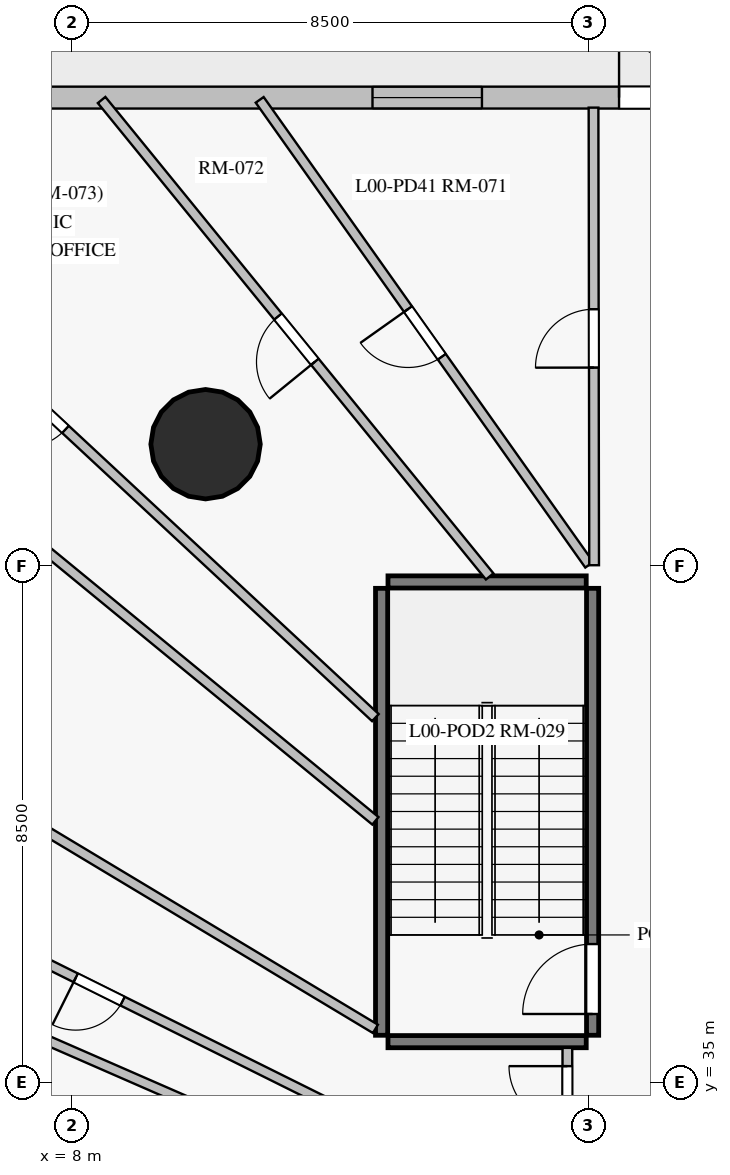
"""IFC4 building model, lengths in metres.
Left out: names, types, materials, properties, quantities, classifications, styles, units other than length and angle.
Written with IfcOpenShell. Run it as: python <this file> out.ifc"""

import sys

from ifc_helpers import new_model, si_unit, direction, frame, frame_2d, origin, origin_with_axes, origin_2d, place, context, subcontext, project, spatial, rectangle, circle, extrude, source, transform, mapped, element, fill, save


model = new_model("IFC4")
c1 = context("Model", 3, precision=1e-05, world=origin(), true_north=direction((0.0, 1.0)))
c2 = subcontext(c1, "Body", "Model", "MODEL_VIEW")
j1 = project(units=[si_unit("LENGTHUNIT", "METRE"), si_unit("PLANEANGLEUNIT", "RADIAN")], contexts=[c1])
p1 = place(None, origin())
s1 = spatial("IfcSite", under=j1, at=p1, CompositionType="ELEMENT")
p2 = place(p1, origin())
s2 = spatial("IfcBuilding", under=s1, at=p2, CompositionType="ELEMENT")
p3 = place(p2, origin())
s3 = spatial("IfcBuildingStorey", under=s2, at=p3, CompositionType="ELEMENT", Elevation=0.0)
m1 = source(origin_with_axes(), c2, "Body", "SweptSolid", [
    extrude(circle(Radius=0.9, at=origin_2d()), origin(), (0.0, 0.0, 1.0), 4.5),
])
p4 = place(p3, frame((10.2, 45.5, 0.0), z_axis=(0.0, 0.0, 1.0), x_axis=(1.0, 0.0, 0.0)))
e1 = element("IfcColumn", 1, at=p4, inside=s3, PredefinedType="COLUMN", context=c2, shape_type="MappedRepresentation", body=[
    mapped(m1, transform((0.0, 0.0, 0.0), scale=1.0)),
])
p5 = place(p3, frame((1.5, 51.2, 0.0), z_axis=(0.0, 0.0, 1.0), x_axis=(1.0, 0.0, 0.0)))
e2 = element("IfcWall", 2, at=p5, inside=s3, PredefinedType="SOLIDWALL", context=c2, shape_type="SweptSolid", body=[
    extrude(rectangle(XDim=54.6, YDim=0.36, at=frame_2d((27.3, 0.0))), origin(), (0.0, 0.0, 1.0), 4.2),
])
p6 = place(p5, frame((51.007, 0.0, 0.85)))
e3 = element("IfcOpeningElement", 3, at=p6, cuts=e2, PredefinedType="OPENING", context=c2, shape_type="SweptSolid", body=[
    extrude(rectangle(XDim=1.8, YDim=2.2, at=frame_2d((0.9, 1.1))), frame((0.0, 0.19, 0.0), z_axis=(0.0, -1.0, 0.0), x_axis=(1.0, 0.0, 0.0)), (0.0, 0.0, 1.0), 0.38),
])
p7 = place(p5, frame((46.765, 0.0, 0.85)))
e4 = element("IfcOpeningElement", 4, at=p7, cuts=e2, PredefinedType="OPENING", context=c2, shape_type="SweptSolid", body=[
    extrude(rectangle(XDim=1.8, YDim=2.2, at=frame_2d((0.9, 1.1))), frame((0.0, 0.19, 0.0), z_axis=(0.0, -1.0, 0.0), x_axis=(1.0, 0.0, 0.0)), (0.0, 0.0, 1.0), 0.38),
])
p8 = place(p5, frame((41.844, 0.0, 0.85)))
e5 = element("IfcOpeningElement", 5, at=p8, cuts=e2, PredefinedType="OPENING", context=c2, shape_type="SweptSolid", body=[
    extrude(rectangle(XDim=1.8, YDim=2.2, at=frame_2d((0.9, 1.1))), frame((0.0, 0.19, 0.0), z_axis=(0.0, -1.0, 0.0), x_axis=(1.0, 0.0, 0.0)), (0.0, 0.0, 1.0), 0.38),
])
p9 = place(p5, frame((36.894, 0.0, 0.85)))
e6 = element("IfcOpeningElement", 6, at=p9, cuts=e2, PredefinedType="OPENING", context=c2, shape_type="SweptSolid", body=[
    extrude(rectangle(XDim=1.8, YDim=2.2, at=frame_2d((0.9, 1.1))), frame((0.0, 0.19, 0.0), z_axis=(0.0, -1.0, 0.0), x_axis=(1.0, 0.0, 0.0)), (0.0, 0.0, 1.0), 0.38),
])
p10 = place(p5, frame((29.542, 0.0, 0.85)))
e7 = element("IfcOpeningElement", 7, at=p10, cuts=e2, PredefinedType="OPENING", context=c2, shape_type="SweptSolid", body=[
    extrude(rectangle(XDim=1.8, YDim=2.2, at=frame_2d((0.9, 1.1))), frame((0.0, 0.19, 0.0), z_axis=(0.0, -1.0, 0.0), x_axis=(1.0, 0.0, 0.0)), (0.0, 0.0, 1.0), 0.38),
])
p11 = place(p5, frame((25.094, 0.0, 0.85)))
e8 = element("IfcOpeningElement", 8, at=p11, cuts=e2, PredefinedType="OPENING", context=c2, shape_type="SweptSolid", body=[
    extrude(rectangle(XDim=1.8, YDim=2.2, at=frame_2d((0.9, 1.1))), frame((0.0, 0.19, 0.0), z_axis=(0.0, -1.0, 0.0), x_axis=(1.0, 0.0, 0.0)), (0.0, 0.0, 1.0), 0.38),
])
p12 = place(p5, frame((11.445, 0.0, 0.85)))
e9 = element("IfcOpeningElement", 9, at=p12, cuts=e2, PredefinedType="OPENING", context=c2, shape_type="SweptSolid", body=[
    extrude(rectangle(XDim=1.8, YDim=2.2, at=frame_2d((0.9, 1.1))), frame((0.0, 0.19, 0.0), z_axis=(0.0, -1.0, 0.0), x_axis=(1.0, 0.0, 0.0)), (0.0, 0.0, 1.0), 0.38),
])
p13 = place(p5, frame((2.908, 0.0, 0.85)))
e10 = element("IfcOpeningElement", 10, at=p13, cuts=e2, PredefinedType="OPENING", context=c2, shape_type="SweptSolid", body=[
    extrude(rectangle(XDim=1.8, YDim=2.2, at=frame_2d((0.9, 1.1))), frame((0.0, 0.19, 0.0), z_axis=(0.0, -1.0, 0.0), x_axis=(1.0, 0.0, 0.0)), (0.0, 0.0, 1.0), 0.38),
])
p14 = place(p5, frame((19.6, 0.0, 0.0)))
e11 = element("IfcOpeningElement", 11, at=p14, cuts=e2, PredefinedType="OPENING", context=c2, shape_type="SweptSolid", body=[
    extrude(rectangle(XDim=1.8, YDim=2.3, at=frame_2d((0.9, 1.15))), frame((0.0, 0.19, 0.0), z_axis=(0.0, -1.0, 0.0), x_axis=(1.0, 0.0, 0.0)), (0.0, 0.0, 1.0), 0.38),
])
p15 = place(p5, frame((22.2, 0.0, 0.0)))
e12 = element("IfcOpeningElement", 12, at=p15, cuts=e2, PredefinedType="OPENING", context=c2, shape_type="SweptSolid", body=[
    extrude(rectangle(XDim=1.8, YDim=2.3, at=frame_2d((0.9, 1.15))), frame((0.0, 0.19, 0.0), z_axis=(0.0, -1.0, 0.0), x_axis=(1.0, 0.0, 0.0)), (0.0, 0.0, 1.0), 0.38),
])
p16 = place(p5, frame((15.5, 0.0, 0.0)))
e13 = element("IfcOpeningElement", 13, at=p16, cuts=e2, PredefinedType="OPENING", context=c2, shape_type="SweptSolid", body=[
    extrude(rectangle(XDim=1.8, YDim=2.3, at=frame_2d((0.9, 1.15))), frame((0.0, 0.19, 0.0), z_axis=(0.0, -1.0, 0.0), x_axis=(1.0, 0.0, 0.0)), (0.0, 0.0, 1.0), 0.38),
])
p17 = place(p3, frame((13.095, 35.78, 0.0), z_axis=(0.0, 0.0, 1.0), x_axis=(0.0, 1.0, 0.0)))
e14 = element("IfcWall", 14, at=p17, inside=s3, PredefinedType="SHEAR", context=c2, shape_type="SweptSolid", body=[
    extrude(rectangle(XDim=7.35, YDim=0.2, at=frame_2d((3.675, 0.0))), origin(), (0.0, 0.0, 1.0), 4.2),
])
p18 = place(p3, frame((16.565, 35.78, 0.0), z_axis=(0.0, 0.0, 1.0), x_axis=(0.0, 1.0, 0.0)))
e15 = element("IfcWall", 15, at=p18, inside=s3, PredefinedType="SHEAR", context=c2, shape_type="SweptSolid", body=[
    extrude(rectangle(XDim=7.35, YDim=0.2, at=frame_2d((3.675, 0.0))), origin(), (0.0, 0.0, 1.0), 4.2),
])
p19 = place(p18, frame((0.35, 0.0, 0.0)))
e16 = element("IfcOpeningElement", 16, at=p19, cuts=e15, PredefinedType="OPENING", context=c2, shape_type="SweptSolid", body=[
    extrude(rectangle(XDim=1.15, YDim=2.15, at=frame_2d((0.575, 1.075))), frame((0.0, 0.11, 0.0), z_axis=(0.0, -1.0, 0.0), x_axis=(1.0, 0.0, 0.0)), (0.0, 0.0, 1.0), 0.22),
])
for number, where, z_axis, x_axis in (
    (17, (13.2, 35.675, 0.0), (0.0, 0.0, 1.0), (1.0, 0.0, 0.0)),
    (18, (13.2, 43.235, 0.0), (0.0, 0.0, 1.0), (1.0, 0.0, 0.0)),
):
    element("IfcWall", number, at=place(p3, frame(where, z_axis=z_axis, x_axis=x_axis)), inside=s3, PredefinedType="SHEAR", context=c2, shape_type="SweptSolid", body=[
        extrude(rectangle(XDim=3.26, YDim=0.2, at=frame_2d((1.63, 0.0))), origin(), (0.0, 0.0, 1.0), 4.2),
    ])
p20 = place(p3, frame((16.068, 32.747, 0.0), z_axis=(0.0, 0.0, 1.0), x_axis=(-0.895480769827, 0.44510020318, 0.0)))
e19 = element("IfcWall", 19, at=p20, inside=s3, PredefinedType="PARTITIONING", context=c2, shape_type="SweptSolid", body=[
    extrude(rectangle(XDim=17.015, YDim=0.16, at=frame_2d((8.507, 0.0))), origin(), (0.0, 0.0, 1.0), 4.2),
])
p21 = place(p20, frame((8.077, 0.0, 0.0)))
e20 = element("IfcOpeningElement", 20, at=p21, cuts=e19, PredefinedType="OPENING", context=c2, shape_type="SweptSolid", body=[
    extrude(rectangle(XDim=0.86, YDim=2.04, at=frame_2d((0.43, 1.02))), frame((0.0, 0.09, 0.0), z_axis=(0.0, -1.0, 0.0), x_axis=(1.0, 0.0, 0.0)), (0.0, 0.0, 1.0), 0.18),
])
p22 = place(p3, frame((16.068, 31.996, 0.0), z_axis=(0.0, 0.0, 1.0), x_axis=(-0.916400464202, 0.400262650281, 0.0)))
e21 = element("IfcWall", 21, at=p22, inside=s3, PredefinedType="PARTITIONING", context=c2, shape_type="SweptSolid", body=[
    extrude(rectangle(XDim=16.628, YDim=0.16, at=frame_2d((8.314, 0.0))), origin(), (0.0, 0.0, 1.0), 4.2),
])
p23 = place(p3, frame((12.993, 39.307, 0.0), z_axis=(0.0, 0.0, 1.0), x_axis=(-0.772944890545, 0.634473164272, 0.0)))
e22 = element("IfcWall", 22, at=p23, inside=s3, PredefinedType="PARTITIONING", context=c2, shape_type="SweptSolid", body=[
    extrude(rectangle(XDim=15.723, YDim=0.16, at=frame_2d((7.862, 0.0))), origin(), (0.0, 0.0, 1.0), 4.2),
])
p24 = place(p3, frame((12.993, 41.004, 0.0), z_axis=(0.0, 0.0, 1.0), x_axis=(-0.732268799171, 0.681015716236, 0.0)))
e23 = element("IfcWall", 23, at=p24, inside=s3, PredefinedType="PARTITIONING", context=c2, shape_type="SweptSolid", body=[
    extrude(rectangle(XDim=14.905, YDim=0.16, at=frame_2d((7.452, 0.0))), origin(), (0.0, 0.0, 1.0), 4.2),
])
p25 = place(p24, frame((6.96, 0.0, 0.0)))
e24 = element("IfcOpeningElement", 24, at=p25, cuts=e23, PredefinedType="OPENING", context=c2, shape_type="SweptSolid", body=[
    extrude(rectangle(XDim=0.96, YDim=2.15, at=frame_2d((0.48, 1.075))), frame((0.0, 0.09, 0.0), z_axis=(0.0, -1.0, 0.0), x_axis=(1.0, 0.0, 0.0)), (0.0, 0.0, 1.0), 0.18),
])
p26 = place(p3, frame((12.993, 35.885, 0.0), z_axis=(0.0, 0.0, 1.0), x_axis=(-0.857213350392, 0.514961427594, 0.0)))
e25 = element("IfcWall", 25, at=p26, inside=s3, PredefinedType="PARTITIONING", context=c2, shape_type="SweptSolid", body=[
    extrude(rectangle(XDim=14.184, YDim=0.16, at=frame_2d((7.092, 0.0))), origin(), (0.0, 0.0, 1.0), 4.2),
])
p27 = place(p26, frame((6.6, 0.0, 0.0)))
e26 = element("IfcOpeningElement", 26, at=p27, cuts=e25, PredefinedType="OPENING", context=c2, shape_type="SweptSolid", body=[
    extrude(rectangle(XDim=0.96, YDim=2.15, at=frame_2d((0.48, 1.075))), frame((0.0, 0.09, 0.0), z_axis=(0.0, -1.0, 0.0), x_axis=(1.0, 0.0, 0.0)), (0.0, 0.0, 1.0), 0.18),
])
p28 = place(p3, frame((14.872, 43.325, 0.0), z_axis=(0.0, 0.0, 1.0), x_axis=(-0.63154172537, 0.775341891759, 0.0)))
e27 = element("IfcWall", 27, at=p28, inside=s3, PredefinedType="PARTITIONING", context=c2, shape_type="SweptSolid", body=[
    extrude(rectangle(XDim=10.105, YDim=0.16, at=frame_2d((5.053, 0.0))), origin(), (0.0, 0.0, 1.0), 4.2),
])
p29 = place(p28, frame((4.552, 0.0, 0.0)))
e28 = element("IfcOpeningElement", 28, at=p29, cuts=e27, PredefinedType="OPENING", context=c2, shape_type="SweptSolid", body=[
    extrude(rectangle(XDim=0.96, YDim=2.15, at=frame_2d((0.48, 1.075))), frame((0.0, 0.09, 0.0), z_axis=(0.0, -1.0, 0.0), x_axis=(1.0, 0.0, 0.0)), (0.0, 0.0, 1.0), 0.18),
])
p30 = place(p3, frame((16.51, 43.518, 0.0), z_axis=(0.0, 0.0, 1.0), x_axis=(-0.578309317505, 0.815817585792, 0.0)))
e29 = element("IfcWall", 29, at=p30, inside=s3, PredefinedType="PARTITIONING", context=c2, shape_type="SweptSolid", body=[
    extrude(rectangle(XDim=9.372, YDim=0.16, at=frame_2d((4.686, 0.0))), origin(), (0.0, 0.0, 1.0), 4.2),
])
p31 = place(p30, frame((4.193, 0.0, 0.0)))
e30 = element("IfcOpeningElement", 30, at=p31, cuts=e29, PredefinedType="OPENING", context=c2, shape_type="SweptSolid", body=[
    extrude(rectangle(XDim=0.96, YDim=2.15, at=frame_2d((0.48, 1.075))), frame((0.0, 0.09, 0.0), z_axis=(0.0, -1.0, 0.0), x_axis=(1.0, 0.0, 0.0)), (0.0, 0.0, 1.0), 0.18),
])
p32 = place(p3, frame((16.59, 43.51, 0.0), z_axis=(0.0, 0.0, 1.0), x_axis=(-0.001297773224, 0.999999157892, 0.0)))
e31 = element("IfcWall", 31, at=p32, inside=s3, PredefinedType="PARTITIONING", context=c2, shape_type="SweptSolid", body=[
    extrude(rectangle(XDim=7.525, YDim=0.16, at=frame_2d((3.762, 0.0))), origin(), (0.0, 0.0, 1.0), 4.2),
])
p33 = place(p32, frame((3.25, 0.0, 0.0)))
e32 = element("IfcOpeningElement", 32, at=p33, cuts=e31, PredefinedType="OPENING", context=c2, shape_type="SweptSolid", body=[
    extrude(rectangle(XDim=0.96, YDim=2.15, at=frame_2d((0.48, 1.075))), frame((0.0, 0.09, 0.0), z_axis=(0.0, -1.0, 0.0), x_axis=(1.0, 0.0, 0.0)), (0.0, 0.0, 1.0), 0.18),
])
p34 = place(p3, frame((16.15, 29.712, 0.0), z_axis=(0.0, 0.0, 1.0), x_axis=(0.0, 1.0, 0.0)))
e33 = element("IfcWall", 33, at=p34, inside=s3, PredefinedType="PARTITIONING", context=c2, shape_type="SweptSolid", body=[
    extrude(rectangle(XDim=5.861, YDim=0.16, at=frame_2d((2.93, 0.0))), origin(), (0.0, 0.0, 1.0), 4.2),
])
p35 = place(p34, frame((3.459, 0.0, 0.0)))
e34 = element("IfcOpeningElement", 34, at=p35, cuts=e33, PredefinedType="OPENING", context=c2, shape_type="SweptSolid", body=[
    extrude(rectangle(XDim=0.96, YDim=2.15, at=frame_2d((0.48, 1.075))), frame((0.0, 0.09, 0.0), z_axis=(0.0, -1.0, 0.0), x_axis=(1.0, 0.0, 0.0)), (0.0, 0.0, 1.0), 0.18),
])
p36 = place(p34, frame((1.1, 0.0, 0.0)))
e35 = element("IfcOpeningElement", 35, at=p36, cuts=e33, PredefinedType="OPENING", context=c2, shape_type="SweptSolid", body=[
    extrude(rectangle(XDim=0.96, YDim=2.15, at=frame_2d((0.48, 1.075))), frame((0.0, 0.09, 0.0), z_axis=(0.0, -1.0, 0.0), x_axis=(1.0, 0.0, 0.0)), (0.0, 0.0, 1.0), 0.18),
])
p37 = place(p34, frame((4.601, 0.0, 0.0)))
e36 = element("IfcOpeningElement", 36, at=p37, cuts=e33, PredefinedType="OPENING", context=c2, shape_type="SweptSolid", body=[
    extrude(rectangle(XDim=0.96, YDim=2.15, at=frame_2d((0.48, 1.075))), frame((0.0, 0.09, 0.0), z_axis=(0.0, -1.0, 0.0), x_axis=(1.0, 0.0, 0.0)), (0.0, 0.0, 1.0), 0.18),
])
m2 = source(origin_with_axes(), c2, "Body", "SweptSolid", [
    extrude(rectangle(XDim=1.8, YDim=2.2, at=frame_2d((0.9, 1.1))), frame((0.0, 0.03, 0.0), z_axis=(0.0, -1.0, 0.0), x_axis=(1.0, 0.0, 0.0)), (0.0, 0.0, 1.0), 0.06),
])
p38 = place(p12, origin())
e37 = element("IfcWindow", 37, at=p38, inside=s3, PartitioningType="SINGLE_PANEL", PredefinedType="WINDOW", context=c2, shape_type="MappedRepresentation", body=[
    mapped(m2, transform((0.0, 0.0, 0.0), scale=1.0)),
])
fill(e9, e37)
m3 = source(origin_with_axes(), c2, "Body", "SweptSolid", [
    extrude(rectangle(XDim=1.8, YDim=2.3, at=frame_2d((0.9, 1.15))), frame((0.0, 0.025, 0.0), z_axis=(0.0, -1.0, 0.0), x_axis=(1.0, 0.0, 0.0)), (0.0, 0.0, 1.0), 0.05),
])
p39 = place(p16, origin())
e38 = element("IfcDoor", 38, at=p39, inside=s3, OperationType="DOUBLE_DOOR_SINGLE_SWING", PredefinedType="DOOR", context=c2, shape_type="MappedRepresentation", body=[
    mapped(m3, transform((0.0, 0.0, 0.0), scale=1.0)),
])
fill(e13, e38)
m4 = source(origin_with_axes(), c2, "Body", "SweptSolid", [
    extrude(rectangle(XDim=1.15, YDim=2.15, at=frame_2d((0.575, 1.075))), frame((0.0, 0.025, 0.0), z_axis=(0.0, -1.0, 0.0), x_axis=(1.0, 0.0, 0.0)), (0.0, 0.0, 1.0), 0.05),
])
p40 = place(p19, origin())
e39 = element("IfcDoor", 39, at=p40, inside=s3, OperationType="SINGLE_SWING_LEFT", PredefinedType="DOOR", context=c2, shape_type="MappedRepresentation", body=[
    mapped(m4, transform((0.0, 0.0, 0.0), scale=1.0)),
])
fill(e16, e39)
m5 = source(origin_with_axes(), c2, "Body", "SweptSolid", [
    extrude(rectangle(XDim=0.96, YDim=2.15, at=frame_2d((0.48, 1.075))), frame((0.0, 0.025, 0.0), z_axis=(0.0, -1.0, 0.0), x_axis=(1.0, 0.0, 0.0)), (0.0, 0.0, 1.0), 0.05),
])
p41 = place(p33, origin())
e40 = element("IfcDoor", 40, at=p41, inside=s3, OperationType="SINGLE_SWING_LEFT", PredefinedType="DOOR", context=c2, shape_type="MappedRepresentation", body=[
    mapped(m5, transform((0.0, 0.0, 0.0), scale=1.0)),
])
fill(e32, e40)
p42 = place(p31, origin())
e41 = element("IfcDoor", 41, at=p42, inside=s3, OperationType="SINGLE_SWING_RIGHT", PredefinedType="DOOR", context=c2, shape_type="MappedRepresentation", body=[
    mapped(m5, transform((0.0, 0.0, 0.0), scale=1.0)),
])
fill(e30, e41)
p43 = place(p29, origin())
e42 = element("IfcDoor", 42, at=p43, inside=s3, OperationType="SINGLE_SWING_LEFT", PredefinedType="DOOR", context=c2, shape_type="MappedRepresentation", body=[
    mapped(m5, transform((0.0, 0.0, 0.0), scale=1.0)),
])
fill(e28, e42)
p44 = place(p25, origin())
e43 = element("IfcDoor", 43, at=p44, inside=s3, OperationType="SINGLE_SWING_RIGHT", PredefinedType="DOOR", context=c2, shape_type="MappedRepresentation", body=[
    mapped(m5, transform((0.0, 0.0, 0.0), scale=1.0)),
])
fill(e24, e43)
p45 = place(p37, origin())
e44 = element("IfcDoor", 44, at=p45, inside=s3, OperationType="SINGLE_SWING_RIGHT", PredefinedType="DOOR", context=c2, shape_type="MappedRepresentation", body=[
    mapped(m5, transform((0.0, 0.0, 0.0), scale=1.0)),
])
fill(e36, e44)
m6 = source(origin_with_axes(), c2, "Body", "SweptSolid", [
    extrude(rectangle(XDim=0.86, YDim=2.04, at=frame_2d((0.43, 1.02))), frame((0.0, 0.025, 0.0), z_axis=(0.0, -1.0, 0.0), x_axis=(1.0, 0.0, 0.0)), (0.0, 0.0, 1.0), 0.05),
])
p46 = place(p21, origin())
e45 = element("IfcDoor", 45, at=p46, inside=s3, OperationType="SINGLE_SWING_RIGHT", PredefinedType="DOOR", context=c2, shape_type="MappedRepresentation", body=[
    mapped(m6, transform((0.0, 0.0, 0.0), scale=1.0)),
])
fill(e20, e45)
save(model, sys.argv[1])
